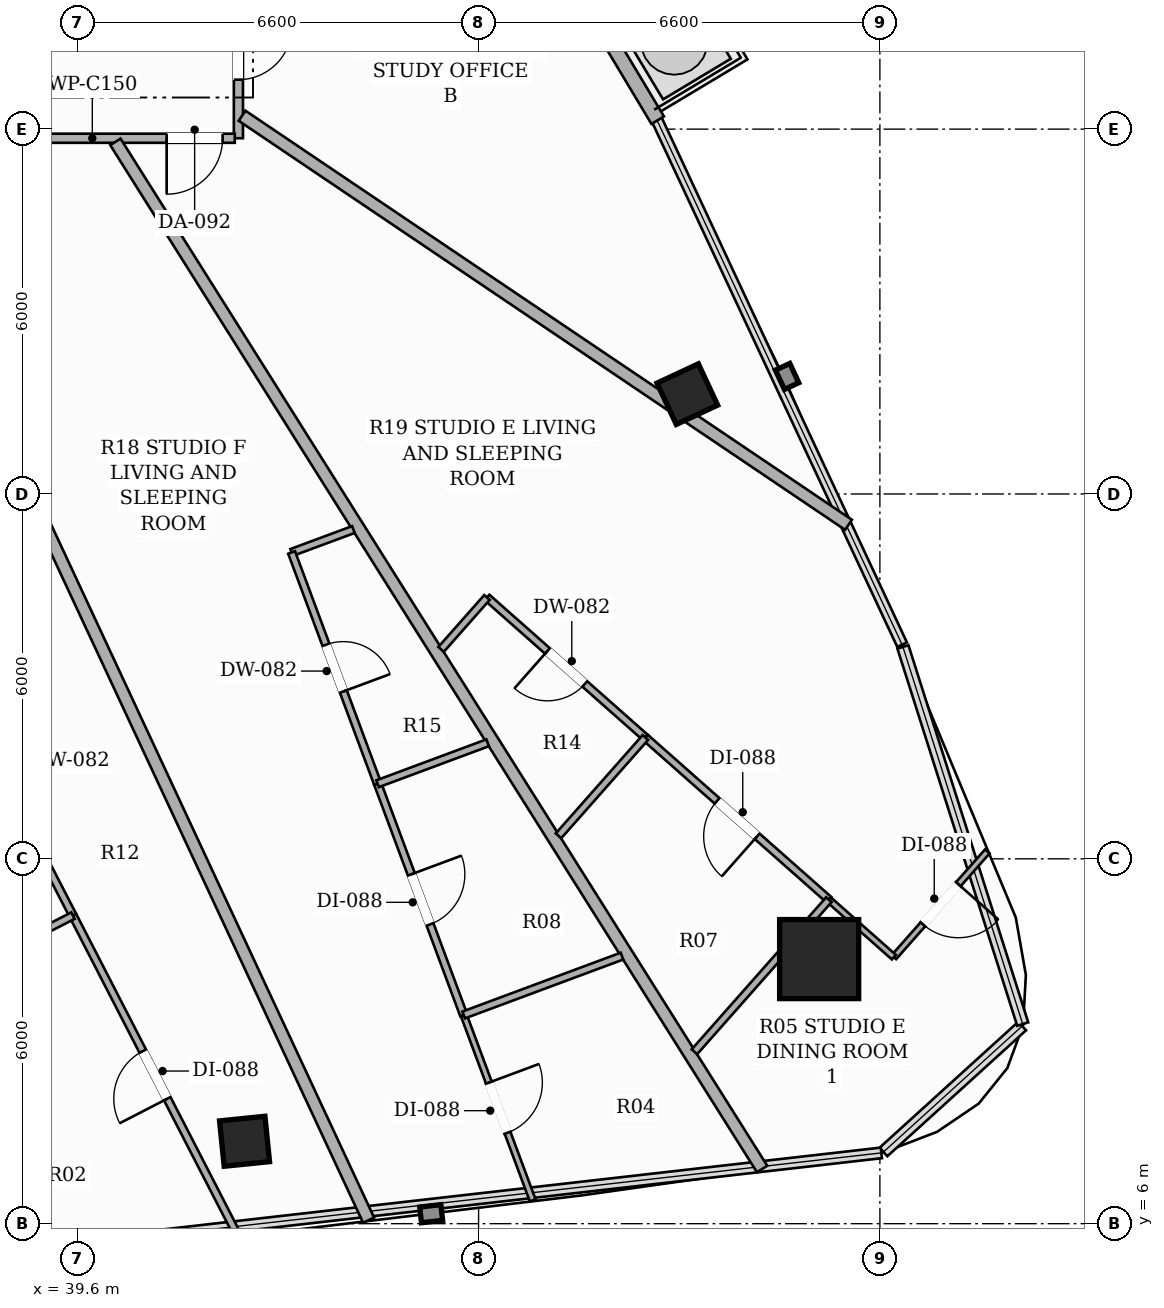
"""IFC4 building model, lengths in metres.
Left out: names, types, materials, properties, quantities, classifications, styles, units other than length and angle.
Written with IfcOpenShell. Run it as: python <this file> out.ifc"""

import sys

from ifc_helpers import new_model, si_unit, direction, frame, frame_2d, origin, origin_2d, place, context, subcontext, project, spatial, rectangle, hollow_rectangle, extrude, element, fill, save


model = new_model("IFC4")
c1 = context("Model", 3, precision=1e-05, world=origin(), true_north=direction((0.0, 1.0)))
c2 = subcontext(c1, "Body", "Model", "MODEL_VIEW")
j1 = project(units=[si_unit("LENGTHUNIT", "METRE"), si_unit("PLANEANGLEUNIT", "RADIAN")], contexts=[c1])
p1 = place(None, origin())
s1 = spatial("IfcSite", under=j1, at=p1, CompositionType="ELEMENT")
p2 = place(p1, origin())
s2 = spatial("IfcBuilding", under=s1, at=p2, CompositionType="ELEMENT")
p3 = place(p2, frame((0.0, 0.0, 250.25)))
s3 = spatial("IfcBuildingStorey", under=s2, at=p3, CompositionType="ELEMENT", Elevation=250.25)
p4 = place(p3, frame((51.801, 10.351, 0.0), z_axis=(0.0, 0.0, 1.0), x_axis=(1.0, 0.0, 0.0)))
e1 = element("IfcColumn", 1, at=p4, inside=s3, PredefinedType="COLUMN", context=c2, shape_type="SweptSolid", body=[
    extrude(hollow_rectangle(XDim=1.3, YDim=1.3, WallThickness=0.04, at=origin_2d()), origin(), (0.0, 0.0, 1.0), 3.3),
])
for number, where, z_axis, x_axis in (
    (2, (42.351, 7.355, 0.0), (0.0, 0.0, 1.0), (0.995, 0.101, 0.0)),
    (3, (49.633, 19.642, 0.0), (0.0, 0.0, 1.0), (-0.423, 0.906, 0.0)),
):
    element("IfcColumn", number, at=place(p3, frame(where, z_axis=z_axis, x_axis=x_axis)), inside=s3, PredefinedType="COLUMN", context=c2, shape_type="SweptSolid", body=[
        extrude(hollow_rectangle(XDim=0.75, YDim=0.75, WallThickness=0.025, at=origin_2d()), origin(), (0.0, 0.0, 1.0), 3.3),
    ])
p5 = place(p3, frame((49.146, 24.147, 0.0), z_axis=(0.0, 0.0, 1.0), x_axis=(-0.514275407092, 0.857625096216, 0.0)))
e4 = element("IfcWall", 4, at=p5, inside=s3, PredefinedType="SOLIDWALL", context=c2, shape_type="SweptSolid", body=[
    extrude(rectangle(XDim=9.777, YDim=0.24, at=frame_2d((4.889, 0.0))), origin(), (0.0, 0.0, 1.0), 2.624),
])
p6 = place(p5, frame((7.279, 0.0, 0.0)))
e5 = element("IfcOpeningElement", 5, at=p6, cuts=e4, PredefinedType="OPENING", context=c2, shape_type="SweptSolid", body=[
    extrude(rectangle(XDim=1.8, YDim=2.2, at=frame_2d((0.9, 1.1))), frame((0.0, 0.13, 0.0), z_axis=(0.0, -1.0, 0.0), x_axis=(1.0, 0.0, 0.0)), (0.0, 0.0, 1.0), 0.26),
])
p7 = place(p3, frame((42.25, 26.59, 0.0), z_axis=(0.0, 0.0, 1.0), x_axis=(0.0, -1.0, 0.0)))
e6 = element("IfcWall", 6, at=p7, inside=s3, PredefinedType="PARTITIONING", context=c2, shape_type="SweptSolid", body=[
    extrude(rectangle(XDim=2.74, YDim=0.15, at=frame_2d((1.37, 0.0))), origin(), (0.0, 0.0, 1.0), 2.773),
])
p8 = place(p7, frame((0.897, 0.0, 0.0)))
e7 = element("IfcOpeningElement", 7, at=p8, cuts=e6, PredefinedType="OPENING", context=c2, shape_type="SweptSolid", body=[
    extrude(rectangle(XDim=0.88, YDim=2.1, at=frame_2d((0.44, 1.05))), frame((0.0, 0.085, 0.0), z_axis=(0.0, -1.0, 0.0), x_axis=(1.0, 0.0, 0.0)), (0.0, 0.0, 1.0), 0.17),
])
p9 = place(p3, frame((42.19, 23.85, 0.0), z_axis=(0.0, 0.0, 1.0), x_axis=(-1.0, 0.0, 0.0)))
e8 = element("IfcWall", 8, at=p9, inside=s3, PredefinedType="PARTITIONING", context=c2, shape_type="SweptSolid", body=[
    extrude(rectangle(XDim=8.355, YDim=0.15, at=frame_2d((4.177, 0.0))), origin(), (0.0, 0.0, 1.0), 2.565),
])
p10 = place(p9, frame((0.2, 0.0, 0.0)))
e9 = element("IfcOpeningElement", 9, at=p10, cuts=e8, PredefinedType="OPENING", context=c2, shape_type="SweptSolid", body=[
    extrude(rectangle(XDim=0.92, YDim=2.15, at=frame_2d((0.46, 1.075))), frame((0.0, 0.085, 0.0), z_axis=(0.0, -1.0, 0.0), x_axis=(1.0, 0.0, 0.0)), (0.0, 0.0, 1.0), 0.17),
])
p11 = place(p9, frame((3.566, 0.0, 0.0)))
e10 = element("IfcOpeningElement", 10, at=p11, cuts=e8, PredefinedType="OPENING", context=c2, shape_type="SweptSolid", body=[
    extrude(rectangle(XDim=0.92, YDim=2.15, at=frame_2d((0.46, 1.075))), frame((0.0, 0.085, 0.0), z_axis=(0.0, -1.0, 0.0), x_axis=(1.0, 0.0, 0.0)), (0.0, 0.0, 1.0), 0.17),
])
p12 = place(p9, frame((6.432, 0.0, 0.0)))
e11 = element("IfcOpeningElement", 11, at=p12, cuts=e8, PredefinedType="OPENING", context=c2, shape_type="SweptSolid", body=[
    extrude(rectangle(XDim=0.92, YDim=2.15, at=frame_2d((0.46, 1.075))), frame((0.0, 0.085, 0.0), z_axis=(0.0, -1.0, 0.0), x_axis=(1.0, 0.0, 0.0)), (0.0, 0.0, 1.0), 0.17),
])
p13 = place(p3, frame((52.284, 17.493, 0.0), z_axis=(0.0, 0.0, 1.0), x_axis=(-0.829053532208, 0.559169241584, 0.0)))
e12 = element("IfcWall", 12, at=p13, inside=s3, PredefinedType="PARTITIONING", context=c2, shape_type="SweptSolid", body=[
    extrude(rectangle(XDim=12.031, YDim=0.2, at=frame_2d((6.015, 0.0))), origin(), (0.0, 0.0, 1.0), 2.492),
])
p14 = place(p3, frame((50.863, 6.899, 0.0), z_axis=(0.0, 0.0, 1.0), x_axis=(-0.532843438342, 0.846213844259, 0.0)))
e13 = element("IfcWall", 13, at=p14, inside=s3, PredefinedType="PARTITIONING", context=c2, shape_type="SweptSolid", body=[
    extrude(rectangle(XDim=19.961, YDim=0.2, at=frame_2d((9.98, 0.0))), origin(), (0.0, 0.0, 1.0), 2.492),
])
p15 = place(p3, frame((44.391, 6.058, 0.0), z_axis=(0.0, 0.0, 1.0), x_axis=(-0.422434507673, 0.906393450289, 0.0)))
e14 = element("IfcWall", 14, at=p15, inside=s3, PredefinedType="PARTITIONING", context=c2, shape_type="SweptSolid", body=[
    extrude(rectangle(XDim=19.563, YDim=0.2, at=frame_2d((9.782, 0.0))), origin(), (0.0, 0.0, 1.0), 2.492),
])
p16 = place(p3, frame((48.943, 13.995, 0.0), z_axis=(0.0, 0.0, 1.0), x_axis=(-0.749231040751, 0.662308725275, 0.0)))
e15 = element("IfcWall", 15, at=p16, inside=s3, PredefinedType="PARTITIONING", context=c2, shape_type="SweptSolid", body=[
    extrude(rectangle(XDim=3.477, YDim=0.12, at=frame_2d((1.739, 0.0))), origin(), (0.0, 0.0, 1.0), 2.565),
])
p17 = place(p16, frame((1.329, 0.0, 0.0)))
e16 = element("IfcOpeningElement", 16, at=p17, cuts=e15, PredefinedType="OPENING", context=c2, shape_type="SweptSolid", body=[
    extrude(rectangle(XDim=0.82, YDim=2.1, at=frame_2d((0.41, 1.05))), frame((0.0, 0.07, 0.0), z_axis=(0.0, -1.0, 0.0), x_axis=(1.0, 0.0, 0.0)), (0.0, 0.0, 1.0), 0.14),
])
p18 = place(p3, frame((46.338, 16.298, 0.0), z_axis=(0.0, 0.0, 1.0), x_axis=(-0.662287293934, -0.749249985181, 0.0)))
e17 = element("IfcWall", 17, at=p18, inside=s3, PredefinedType="PARTITIONING", context=c2, shape_type="SweptSolid", body=[
    extrude(rectangle(XDim=1.14, YDim=0.12, at=frame_2d((0.57, 0.0))), origin(), (0.0, 0.0, 1.0), 3.06),
])
p19 = place(p3, frame((51.961, 11.328, 0.0), z_axis=(0.0, 0.0, 1.0), x_axis=(-0.749289212621, 0.662242913024, 0.0)))
e18 = element("IfcWall", 18, at=p19, inside=s3, PredefinedType="PARTITIONING", context=c2, shape_type="SweptSolid", body=[
    extrude(rectangle(XDim=4.028, YDim=0.12, at=frame_2d((2.014, 0.0))), origin(), (0.0, 0.0, 1.0), 2.492),
])
p20 = place(p19, frame((1.574, 0.0, 0.0)))
e19 = element("IfcOpeningElement", 19, at=p20, cuts=e18, PredefinedType="OPENING", context=c2, shape_type="SweptSolid", body=[
    extrude(rectangle(XDim=0.88, YDim=2.1, at=frame_2d((0.44, 1.05))), frame((0.0, 0.07, 0.0), z_axis=(0.0, -1.0, 0.0), x_axis=(1.0, 0.0, 0.0)), (0.0, 0.0, 1.0), 0.14),
])
p21 = place(p3, frame((54.567, 12.122, 0.0), z_axis=(0.0, 0.0, 1.0), x_axis=(-0.662212906575, -0.749315732095, 0.0)))
e20 = element("IfcWall", 20, at=p21, inside=s3, PredefinedType="PARTITIONING", context=c2, shape_type="SweptSolid", body=[
    extrude(rectangle(XDim=2.321, YDim=0.1, at=frame_2d((1.16, 0.0))), origin(), (0.0, 0.0, 1.0), 3.06),
])
p22 = place(p21, frame((0.72, 0.0, 0.0)))
e21 = element("IfcOpeningElement", 21, at=p22, cuts=e20, PredefinedType="OPENING", context=c2, shape_type="SweptSolid", body=[
    extrude(rectangle(XDim=0.88, YDim=2.1, at=frame_2d((0.44, 1.05))), frame((0.0, 0.06, 0.0), z_axis=(0.0, -1.0, 0.0), x_axis=(1.0, 0.0, 0.0)), (0.0, 0.0, 1.0), 0.12),
])
p23 = place(p3, frame((53.03, 10.383, 0.0), z_axis=(0.0, 0.0, 1.0), x_axis=(-0.749313288423, 0.66221567166, 0.0)))
e22 = element("IfcWall", 22, at=p23, inside=s3, PredefinedType="PARTITIONING", context=c2, shape_type="SweptSolid", body=[
    extrude(rectangle(XDim=1.427, YDim=0.1, at=frame_2d((0.713, 0.0))), origin(), (0.0, 0.0, 1.0), 2.492),
])
p24 = place(p3, frame((48.943, 13.995, 0.0), z_axis=(0.0, 0.0, 1.0), x_axis=(-0.662212567735, -0.749316031547, 0.0)))
e23 = element("IfcWall", 23, at=p24, inside=s3, PredefinedType="PARTITIONING", context=c2, shape_type="SweptSolid", body=[
    extrude(rectangle(XDim=2.158, YDim=0.12, at=frame_2d((1.079, 0.0))), origin(), (0.0, 0.0, 1.0), 2.565),
])
p25 = place(p3, frame((51.961, 11.328, 0.0), z_axis=(0.0, 0.0, 1.0), x_axis=(-0.662327669466, -0.74921429395, 0.0)))
e24 = element("IfcWall", 24, at=p25, inside=s3, PredefinedType="PARTITIONING", context=c2, shape_type="SweptSolid", body=[
    extrude(rectangle(XDim=3.338, YDim=0.12, at=frame_2d((1.669, 0.0))), origin(), (0.0, 0.0, 1.0), 2.492),
])
p26 = place(p3, frame((44.141, 17.415, 0.0), z_axis=(0.0, 0.0, 1.0), x_axis=(-0.937563848777, -0.347813210599, 0.0)))
e25 = element("IfcWall", 25, at=p26, inside=s3, PredefinedType="PARTITIONING", context=c2, shape_type="SweptSolid", body=[
    extrude(rectangle(XDim=1.084, YDim=0.12, at=frame_2d((0.542, 0.0))), origin(), (0.0, 0.0, 1.0), 2.773),
])
p27 = place(p3, frame((43.125, 17.038, 0.0), z_axis=(0.0, 0.0, 1.0), x_axis=(0.348728795746, -0.937223680355, 0.0)))
e26 = element("IfcWall", 26, at=p27, inside=s3, PredefinedType="PARTITIONING", context=c2, shape_type="SweptSolid", body=[
    extrude(rectangle(XDim=4.058, YDim=0.12, at=frame_2d((2.029, 0.0))), origin(), (0.0, 0.0, 1.0), 2.773),
])
p28 = place(p27, frame((1.619, 0.0, 0.0)))
e27 = element("IfcOpeningElement", 27, at=p28, cuts=e26, PredefinedType="OPENING", context=c2, shape_type="SweptSolid", body=[
    extrude(rectangle(XDim=0.82, YDim=2.1, at=frame_2d((0.41, 1.05))), frame((0.0, 0.07, 0.0), z_axis=(0.0, -1.0, 0.0), x_axis=(1.0, 0.0, 0.0)), (0.0, 0.0, 1.0), 0.14),
])
p29 = place(p3, frame((44.54, 13.235, 0.0), z_axis=(0.0, 0.0, 1.0), x_axis=(0.348709131935, -0.937230996769, 0.0)))
e28 = element("IfcWall", 28, at=p29, inside=s3, PredefinedType="PARTITIONING", context=c2, shape_type="SweptSolid", body=[
    extrude(rectangle(XDim=4.058, YDim=0.12, at=frame_2d((2.029, 0.0))), origin(), (0.0, 0.0, 1.0), 3.06),
])
p30 = place(p29, frame((1.589, 0.0, 0.0)))
e29 = element("IfcOpeningElement", 29, at=p30, cuts=e28, PredefinedType="OPENING", context=c2, shape_type="SweptSolid", body=[
    extrude(rectangle(XDim=0.88, YDim=2.1, at=frame_2d((0.44, 1.05))), frame((0.0, 0.07, 0.0), z_axis=(0.0, -1.0, 0.0), x_axis=(1.0, 0.0, 0.0)), (0.0, 0.0, 1.0), 0.14),
])
p31 = place(p3, frame((45.955, 9.432, 0.0), z_axis=(0.0, 0.0, 1.0), x_axis=(0.34888547359, -0.937165367647, 0.0)))
e30 = element("IfcWall", 30, at=p31, inside=s3, PredefinedType="PARTITIONING", context=c2, shape_type="SweptSolid", body=[
    extrude(rectangle(XDim=3.253, YDim=0.1, at=frame_2d((1.626, 0.0))), origin(), (0.0, 0.0, 1.0), 2.492),
])
p32 = place(p31, frame((1.187, 0.0, 0.0)))
e31 = element("IfcOpeningElement", 31, at=p32, cuts=e30, PredefinedType="OPENING", context=c2, shape_type="SweptSolid", body=[
    extrude(rectangle(XDim=0.88, YDim=2.1, at=frame_2d((0.44, 1.05))), frame((0.0, 0.06, 0.0), z_axis=(0.0, -1.0, 0.0), x_axis=(1.0, 0.0, 0.0)), (0.0, 0.0, 1.0), 0.12),
])
p33 = place(p3, frame((46.349, 13.908, 0.0), z_axis=(0.0, 0.0, 1.0), x_axis=(-0.937271835507, -0.348599349347, 0.0)))
e32 = element("IfcWall", 32, at=p33, inside=s3, PredefinedType="PARTITIONING", context=c2, shape_type="SweptSolid", body=[
    extrude(rectangle(XDim=1.93, YDim=0.12, at=frame_2d((0.965, 0.0))), origin(), (0.0, 0.0, 1.0), 2.773),
])
p34 = place(p3, frame((48.558, 10.4, 0.0), z_axis=(0.0, 0.0, 1.0), x_axis=(-0.937286649549, -0.34855951655, 0.0)))
e33 = element("IfcWall", 33, at=p34, inside=s3, PredefinedType="PARTITIONING", context=c2, shape_type="SweptSolid", body=[
    extrude(rectangle(XDim=2.777, YDim=0.12, at=frame_2d((1.389, 0.0))), origin(), (0.0, 0.0, 1.0), 2.773),
])
p35 = place(p3, frame((39.529, 11.066, 0.0), z_axis=(0.0, 0.0, 1.0), x_axis=(-0.457798211716, 0.889056127221, 0.0)))
e34 = element("IfcWall", 34, at=p35, inside=s3, PredefinedType="PARTITIONING", context=c2, shape_type="SweptSolid", body=[
    extrude(rectangle(XDim=5.574, YDim=0.12, at=frame_2d((2.787, 0.0))), origin(), (0.0, 0.0, 1.0), 2.773),
])
p36 = place(p35, frame((2.377, 0.0, 0.0)))
e35 = element("IfcOpeningElement", 35, at=p36, cuts=e34, PredefinedType="OPENING", context=c2, shape_type="SweptSolid", body=[
    extrude(rectangle(XDim=0.82, YDim=2.1, at=frame_2d((0.41, 1.05))), frame((0.0, 0.07, 0.0), z_axis=(0.0, -1.0, 0.0), x_axis=(1.0, 0.0, 0.0)), (0.0, 0.0, 1.0), 0.14),
])
p37 = place(p3, frame((42.228, 5.826, 0.0), z_axis=(0.0, 0.0, 1.0), x_axis=(-0.457901041138, 0.889003170143, 0.0)))
e36 = element("IfcWall", 36, at=p37, inside=s3, PredefinedType="PARTITIONING", context=c2, shape_type="SweptSolid", body=[
    extrude(rectangle(XDim=5.894, YDim=0.12, at=frame_2d((2.947, 0.0))), origin(), (0.0, 0.0, 1.0), 2.492),
])
p38 = place(p37, frame((2.507, 0.0, 0.0)))
e37 = element("IfcOpeningElement", 37, at=p38, cuts=e36, PredefinedType="OPENING", context=c2, shape_type="SweptSolid", body=[
    extrude(rectangle(XDim=0.88, YDim=2.1, at=frame_2d((0.44, 1.05))), frame((0.0, 0.07, 0.0), z_axis=(0.0, -1.0, 0.0), x_axis=(1.0, 0.0, 0.0)), (0.0, 0.0, 1.0), 0.14),
])
p39 = place(p3, frame((39.529, 11.066, 0.0), z_axis=(0.0, 0.0, 1.0), x_axis=(-0.889105964634, -0.457701413207, 0.0)))
e38 = element("IfcWall", 38, at=p39, inside=s3, PredefinedType="PARTITIONING", context=c2, shape_type="SweptSolid", body=[
    extrude(rectangle(XDim=2.154, YDim=0.12, at=frame_2d((1.077, 0.0))), origin(), (0.0, 0.0, 1.0), 2.773),
])
p40 = place(p8, origin())
e39 = element("IfcDoor", 39, at=p40, inside=s3, OperationType="SINGLE_SWING_LEFT", PredefinedType="DOOR", context=c2, shape_type="SweptSolid", body=[
    extrude(rectangle(XDim=0.88, YDim=2.1, at=frame_2d((0.44, 1.05))), frame((0.0, 0.025, 0.0), z_axis=(0.0, -1.0, 0.0), x_axis=(1.0, 0.0, 0.0)), (0.0, 0.0, 1.0), 0.05),
])
fill(e7, e39)
p41 = place(p10, origin())
e40 = element("IfcDoor", 40, at=p41, inside=s3, OperationType="SINGLE_SWING_RIGHT", PredefinedType="DOOR", context=c2, shape_type="SweptSolid", body=[
    extrude(rectangle(XDim=0.92, YDim=2.15, at=frame_2d((0.46, 1.075))), frame((0.0, 0.025, 0.0), z_axis=(0.0, -1.0, 0.0), x_axis=(1.0, 0.0, 0.0)), (0.0, 0.0, 1.0), 0.05),
])
fill(e9, e40)
p42 = place(p17, origin())
e41 = element("IfcDoor", 41, at=p42, inside=s3, OperationType="SINGLE_SWING_RIGHT", PredefinedType="DOOR", context=c2, shape_type="SweptSolid", body=[
    extrude(rectangle(XDim=0.82, YDim=2.1, at=frame_2d((0.41, 1.05))), frame((0.0, 0.025, 0.0), z_axis=(0.0, -1.0, 0.0), x_axis=(1.0, 0.0, 0.0)), (0.0, 0.0, 1.0), 0.05),
])
fill(e16, e41)
p43 = place(p20, origin())
e42 = element("IfcDoor", 42, at=p43, inside=s3, OperationType="SINGLE_SWING_LEFT", PredefinedType="DOOR", context=c2, shape_type="SweptSolid", body=[
    extrude(rectangle(XDim=0.88, YDim=2.1, at=frame_2d((0.44, 1.05))), frame((0.0, 0.025, 0.0), z_axis=(0.0, -1.0, 0.0), x_axis=(1.0, 0.0, 0.0)), (0.0, 0.0, 1.0), 0.05),
])
fill(e19, e42)
p44 = place(p22, origin())
e43 = element("IfcDoor", 43, at=p44, inside=s3, OperationType="SINGLE_SWING_LEFT", PredefinedType="DOOR", context=c2, shape_type="SweptSolid", body=[
    extrude(rectangle(XDim=0.88, YDim=2.1, at=frame_2d((0.44, 1.05))), frame((0.0, 0.025, 0.0), z_axis=(0.0, -1.0, 0.0), x_axis=(1.0, 0.0, 0.0)), (0.0, 0.0, 1.0), 0.05),
])
fill(e21, e43)
p45 = place(p28, origin())
e44 = element("IfcDoor", 44, at=p45, inside=s3, OperationType="SINGLE_SWING_RIGHT", PredefinedType="DOOR", context=c2, shape_type="SweptSolid", body=[
    extrude(rectangle(XDim=0.82, YDim=2.1, at=frame_2d((0.41, 1.05))), frame((0.0, 0.025, 0.0), z_axis=(0.0, -1.0, 0.0), x_axis=(1.0, 0.0, 0.0)), (0.0, 0.0, 1.0), 0.05),
])
fill(e27, e44)
p46 = place(p30, origin())
e45 = element("IfcDoor", 45, at=p46, inside=s3, OperationType="SINGLE_SWING_LEFT", PredefinedType="DOOR", context=c2, shape_type="SweptSolid", body=[
    extrude(rectangle(XDim=0.88, YDim=2.1, at=frame_2d((0.44, 1.05))), frame((0.0, 0.025, 0.0), z_axis=(0.0, -1.0, 0.0), x_axis=(1.0, 0.0, 0.0)), (0.0, 0.0, 1.0), 0.05),
])
fill(e29, e45)
p47 = place(p32, origin())
e46 = element("IfcDoor", 46, at=p47, inside=s3, OperationType="SINGLE_SWING_LEFT", PredefinedType="DOOR", context=c2, shape_type="SweptSolid", body=[
    extrude(rectangle(XDim=0.88, YDim=2.1, at=frame_2d((0.44, 1.05))), frame((0.0, 0.025, 0.0), z_axis=(0.0, -1.0, 0.0), x_axis=(1.0, 0.0, 0.0)), (0.0, 0.0, 1.0), 0.05),
])
fill(e31, e46)
p48 = place(p38, origin())
e47 = element("IfcDoor", 47, at=p48, inside=s3, OperationType="SINGLE_SWING_LEFT", PredefinedType="DOOR", context=c2, shape_type="SweptSolid", body=[
    extrude(rectangle(XDim=0.88, YDim=2.1, at=frame_2d((0.44, 1.05))), frame((0.0, 0.025, 0.0), z_axis=(0.0, -1.0, 0.0), x_axis=(1.0, 0.0, 0.0)), (0.0, 0.0, 1.0), 0.05),
])
fill(e37, e47)
save(model, sys.argv[1])
